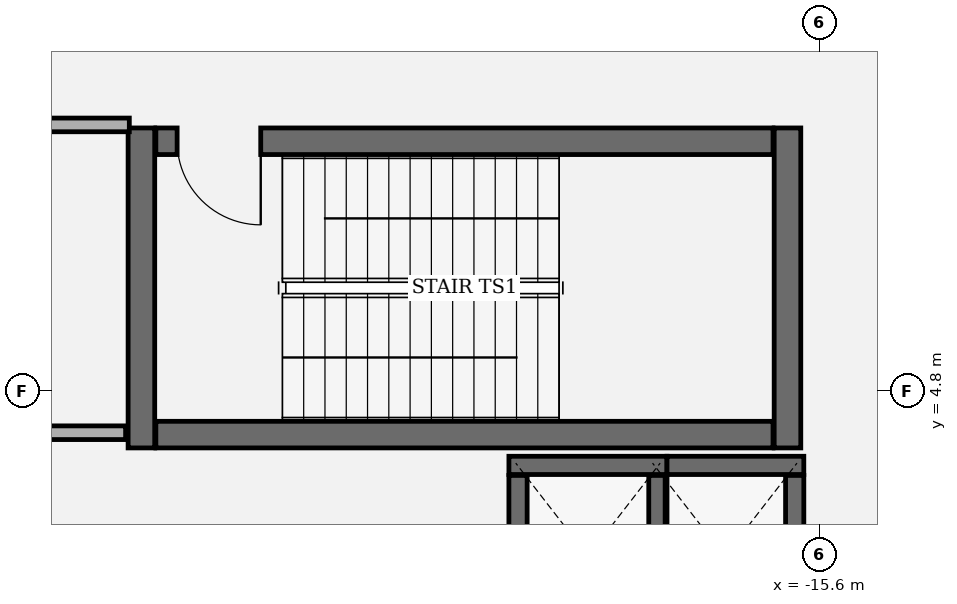
"""IFC4 building model, lengths in metres.
Left out: names, types, materials, properties, quantities, classifications, styles, units other than length and angle.
Written with IfcOpenShell. Run it as: python <this file> out.ifc"""

import sys

from ifc_helpers import new_model, si_unit, direction, frame, frame_2d, origin, place, context, subcontext, project, spatial, rectangle, extrude, element, fill, save


model = new_model("IFC4")
c1 = context("Model", 3, precision=1e-05, world=origin(), true_north=direction((0.0, 1.0)))
c2 = subcontext(c1, "Body", "Model", "MODEL_VIEW")
j1 = project(units=[si_unit("LENGTHUNIT", "METRE"), si_unit("PLANEANGLEUNIT", "RADIAN")], contexts=[c1])
p1 = place(None, origin())
s1 = spatial("IfcSite", under=j1, at=p1, CompositionType="ELEMENT")
p2 = place(p1, origin())
s2 = spatial("IfcBuilding", under=s1, at=p2, CompositionType="ELEMENT")
p3 = place(p2, frame((0.0, 0.0, 22.0)))
s3 = spatial("IfcBuildingStorey", under=s2, at=p3, CompositionType="ELEMENT", Elevation=22.0)
p4 = place(p3, frame((-64.419, 4.637, 0.0), z_axis=(0.0, 0.0, 1.0), x_axis=(0.842602364841, 0.538536214905, 0.0)))
e1 = element("IfcWall", 1, at=p4, inside=s3, PredefinedType="SOLIDWALL", context=c2, shape_type="SweptSolid", body=[
    extrude(rectangle(XDim=60.27, YDim=0.38, at=frame_2d((30.135, 0.0))), origin(), (0.0, 0.0, 1.0), 4.58),
])
p5 = place(p4, frame((29.435, 0.0, 0.8)))
e2 = element("IfcOpeningElement", 2, at=p5, cuts=e1, PredefinedType="OPENING", context=c2, shape_type="SweptSolid", body=[
    extrude(rectangle(XDim=1.4, YDim=1.5, at=frame_2d((0.7, 0.75))), frame((0.0, 0.2, 0.0), z_axis=(0.0, -1.0, 0.0), x_axis=(1.0, 0.0, 0.0)), (0.0, 0.0, 1.0), 0.4),
])
for number, where, z_axis, x_axis in (
    (3, (-24.525, 8.26, 0.0), (0.0, 0.0, 1.0), (0.0, -1.0, 0.0)),
    (4, (-16.025, 4.05, 0.0), (0.0, 0.0, 1.0), (0.0, 1.0, 0.0)),
):
    element("IfcWall", number, at=place(p3, frame(where, z_axis=z_axis, x_axis=x_axis)), inside=s3, PredefinedType="SHEAR", context=c2, shape_type="SweptSolid", body=[
        extrude(rectangle(XDim=4.21, YDim=0.35, at=frame_2d((2.105, 0.0))), origin(), (0.0, 0.0, 1.0), 4.58),
    ])
p6 = place(p3, frame((-24.335, 4.225, 0.0), z_axis=(0.0, 0.0, 1.0), x_axis=(1.0, 0.0, 0.0)))
e5 = element("IfcWall", 5, at=p6, inside=s3, PredefinedType="SHEAR", context=c2, shape_type="SweptSolid", body=[
    extrude(rectangle(XDim=8.12, YDim=0.35, at=frame_2d((4.06, 0.0))), origin(), (0.0, 0.0, 1.0), 4.58),
])
p7 = place(p3, frame((-16.215, 8.085, 0.0), z_axis=(0.0, 0.0, 1.0), x_axis=(-1.0, 0.0, 0.0)))
e6 = element("IfcWall", 6, at=p7, inside=s3, PredefinedType="SHEAR", context=c2, shape_type="SweptSolid", body=[
    extrude(rectangle(XDim=8.12, YDim=0.35, at=frame_2d((4.06, 0.0))), origin(), (0.0, 0.0, 1.0), 4.58),
])
p8 = place(p7, frame((6.74, 0.0, 0.0)))
e7 = element("IfcOpeningElement", 7, at=p8, cuts=e6, PredefinedType="OPENING", context=c2, shape_type="SweptSolid", body=[
    extrude(rectangle(XDim=1.1, YDim=2.2, at=frame_2d((0.55, 1.1))), frame((0.0, 0.185, 0.0), z_axis=(0.0, -1.0, 0.0), x_axis=(1.0, 0.0, 0.0)), (0.0, 0.0, 1.0), 0.37),
])
p9 = place(p3, frame((-19.69, 3.82, 0.0), z_axis=(0.0, 0.0, 1.0), x_axis=(1.0, 0.0, 0.0)))
e8 = element("IfcWall", 8, at=p9, inside=s3, PredefinedType="SHEAR", context=c2, shape_type="SweptSolid", body=[
    extrude(rectangle(XDim=2.08, YDim=0.24, at=frame_2d((1.04, 0.0))), origin(), (0.0, 0.0, 1.0), 4.58),
])
for number, where, z_axis, x_axis in (
    (9, (-19.57, 1.562, 0.0), (0.0, 0.0, 1.0), (0.0, 1.0, 0.0)),
    (10, (-17.73, 3.688, 0.0), (0.0, 0.0, 1.0), (0.0, -1.0, 0.0)),
):
    element("IfcWall", number, at=place(p3, frame(where, z_axis=z_axis, x_axis=x_axis)), inside=s3, PredefinedType="SHEAR", context=c2, shape_type="SweptSolid", body=[
        extrude(rectangle(XDim=2.126, YDim=0.24, at=frame_2d((1.063, 0.0))), origin(), (0.0, 0.0, 1.0), 4.58),
    ])
p10 = place(p3, frame((-17.61, 3.82, 0.0), z_axis=(0.0, 0.0, 1.0), x_axis=(1.0, 0.0, 0.0)))
e11 = element("IfcWall", 11, at=p10, inside=s3, PredefinedType="SHEAR", context=c2, shape_type="SweptSolid", body=[
    extrude(rectangle(XDim=1.8, YDim=0.24, at=frame_2d((0.9, 0.0))), origin(), (0.0, 0.0, 1.0), 4.58),
])
p11 = place(p3, frame((-15.93, 3.688, 0.0), z_axis=(0.0, 0.0, 1.0), x_axis=(0.0, -1.0, 0.0)))
e12 = element("IfcWall", 12, at=p11, inside=s3, PredefinedType="SHEAR", context=c2, shape_type="SweptSolid", body=[
    extrude(rectangle(XDim=2.126, YDim=0.24, at=frame_2d((1.063, 0.0))), origin(), (0.0, 0.0, 1.0), 4.58),
])
p12 = place(p3, frame((-28.355, 4.25, 0.0), z_axis=(0.0, 0.0, 1.0), x_axis=(1.0, 0.0, 0.0)))
e13 = element("IfcWall", 13, at=p12, inside=s3, PredefinedType="PARTITIONING", context=c2, shape_type="SweptSolid", body=[
    extrude(rectangle(XDim=3.622, YDim=0.18, at=frame_2d((1.811, 0.0))), origin(), (0.0, 0.0, 1.0), 4.58),
])
p13 = place(p3, frame((-24.684, 8.3, 0.0), z_axis=(0.0, 0.0, 1.0), x_axis=(-1.0, 0.0, 0.0)))
e14 = element("IfcWall", 14, at=p13, inside=s3, PredefinedType="PARTITIONING", context=c2, shape_type="SweptSolid", body=[
    extrude(rectangle(XDim=3.671, YDim=0.18, at=frame_2d((1.835, 0.0))), origin(), (0.0, 0.0, 1.0), 4.093),
])
p14 = place(p13, frame((1.335, 0.0, 0.0)))
e15 = element("IfcOpeningElement", 15, at=p14, cuts=e14, PredefinedType="OPENING", context=c2, shape_type="SweptSolid", body=[
    extrude(rectangle(XDim=1.0, YDim=2.15, at=frame_2d((0.5, 1.075))), frame((0.0, 0.1, 0.0), z_axis=(0.0, -1.0, 0.0), x_axis=(1.0, 0.0, 0.0)), (0.0, 0.0, 1.0), 0.2),
])
p15 = place(p8, origin())
e16 = element("IfcDoor", 16, at=p15, inside=s3, OperationType="SINGLE_SWING_LEFT", PredefinedType="DOOR", context=c2, shape_type="SweptSolid", body=[
    extrude(rectangle(XDim=1.1, YDim=2.2, at=frame_2d((0.55, 1.1))), frame((0.0, 0.025, 0.0), z_axis=(0.0, -1.0, 0.0), x_axis=(1.0, 0.0, 0.0)), (0.0, 0.0, 1.0), 0.05),
])
fill(e7, e16)
save(model, sys.argv[1])
